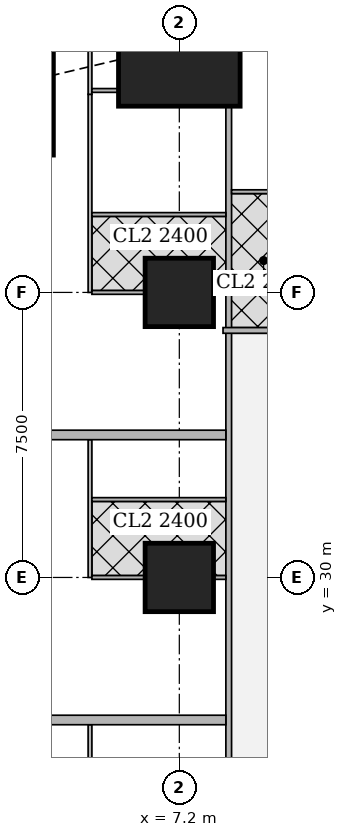
"""IFC4 building model, lengths in metres.
Left out: names, types, materials, properties, quantities, classifications, styles, units other than length and angle.
Written with IfcOpenShell. Run it as: python <this file> out.ifc"""

import sys

from ifc_helpers import new_model, si_unit, direction, frame, frame_2d, origin, origin_2d, place, context, subcontext, project, spatial, rectangle, extrude, element, fill, save


model = new_model("IFC4")
c1 = context("Model", 3, precision=1e-05, world=origin(), true_north=direction((0.0, 1.0)))
c2 = subcontext(c1, "Body", "Model", "MODEL_VIEW")
j1 = project(units=[si_unit("LENGTHUNIT", "METRE"), si_unit("PLANEANGLEUNIT", "RADIAN")], contexts=[c1])
p1 = place(None, origin())
s1 = spatial("IfcSite", under=j1, at=p1, CompositionType="ELEMENT")
p2 = place(p1, origin())
s2 = spatial("IfcBuilding", under=s1, at=p2, CompositionType="ELEMENT")
p3 = place(p2, frame((0.0, 0.0, 20.0)))
s3 = spatial("IfcBuildingStorey", under=s2, at=p3, CompositionType="ELEMENT", Elevation=20.0)
for number, where, z_axis, x_axis in (
    (1, (7.2, 30.0, 0.0), (0.0, 0.0, 1.0), (1.0, 0.0, 0.0)),
    (2, (7.2, 37.5, 0.0), (0.0, 0.0, 1.0), (1.0, 0.0, 0.0)),
):
    element("IfcColumn", number, at=place(p3, frame(where, z_axis=z_axis, x_axis=x_axis)), inside=s3, PredefinedType="COLUMN", context=c2, shape_type="SweptSolid", body=[
        extrude(rectangle(XDim=1.8, YDim=1.8, at=origin_2d()), origin(), (0.0, 0.0, 1.0), 3.75),
    ])
p4 = place(p3, frame((2.186, 42.814, 0.0), z_axis=(0.0, 0.0, 1.0), x_axis=(1.0, 0.0, 0.0)))
e3 = element("IfcColumn", 3, at=p4, inside=s3, PredefinedType="COLUMN", context=c2, shape_type="SweptSolid", body=[
    extrude(rectangle(XDim=3.4, YDim=3.4, at=origin_2d()), origin(), (0.0, 0.0, 1.0), 3.75),
])
p5 = place(p3, frame((7.2, 44.0, -0.3), z_axis=(0.0, 0.0, 1.0), x_axis=(1.0, 0.0, 0.0)))
e4 = element("IfcColumn", 4, at=p5, inside=s3, PredefinedType="COLUMN", context=c2, shape_type="SweptSolid", body=[
    extrude(rectangle(XDim=3.2, YDim=3.2, at=origin_2d()), origin(), (0.0, 0.0, 1.0), 4.05),
])
p6 = place(p3, frame((8.5, 2.626, 0.0), z_axis=(0.0, 0.0, 1.0), x_axis=(0.0, 1.0, 0.0)))
e5 = element("IfcWall", 5, at=p6, inside=s3, PredefinedType="SOLIDWALL", context=c2, shape_type="SweptSolid", body=[
    extrude(rectangle(XDim=39.773, YDim=0.15, at=frame_2d((19.886, 0.0))), origin(), (0.0, 0.0, 1.0), 2.05),
])
p7 = place(p6, frame((9.786, 0.0, 0.0)))
e6 = element("IfcOpeningElement", 6, at=p7, cuts=e5, PredefinedType="OPENING", context=c2, shape_type="SweptSolid", body=[
    extrude(rectangle(XDim=1.0, YDim=2.0, at=frame_2d((0.5, 1.0))), frame((0.0, 0.085, 0.0), z_axis=(0.0, -1.0, 0.0), x_axis=(1.0, 0.0, 0.0)), (0.0, 0.0, 1.0), 0.17),
])
p8 = place(p6, frame((13.961, 0.0, 0.0)))
e7 = element("IfcOpeningElement", 7, at=p8, cuts=e5, PredefinedType="OPENING", context=c2, shape_type="SweptSolid", body=[
    extrude(rectangle(XDim=1.0, YDim=2.0, at=frame_2d((0.5, 1.0))), frame((0.0, 0.085, 0.0), z_axis=(0.0, -1.0, 0.0), x_axis=(1.0, 0.0, 0.0)), (0.0, 0.0, 1.0), 0.17),
])
p9 = place(p6, frame((24.787, 0.0, 0.0)))
e8 = element("IfcOpeningElement", 8, at=p9, cuts=e5, PredefinedType="OPENING", context=c2, shape_type="SweptSolid", body=[
    extrude(rectangle(XDim=1.0, YDim=2.0, at=frame_2d((0.5, 1.0))), frame((0.0, 0.085, 0.0), z_axis=(0.0, -1.0, 0.0), x_axis=(1.0, 0.0, 0.0)), (0.0, 0.0, 1.0), 0.17),
])
p10 = place(p6, frame((32.287, 0.0, 0.0)))
e9 = element("IfcOpeningElement", 9, at=p10, cuts=e5, PredefinedType="OPENING", context=c2, shape_type="SweptSolid", body=[
    extrude(rectangle(XDim=1.0, YDim=2.0, at=frame_2d((0.5, 1.0))), frame((0.0, 0.085, 0.0), z_axis=(0.0, -1.0, 0.0), x_axis=(1.0, 0.0, 0.0)), (0.0, 0.0, 1.0), 0.17),
])
p11 = place(p3, frame((8.35, 36.5, 0.0), z_axis=(0.0, 0.0, 1.0), x_axis=(1.0, 0.0, 0.0)))
e10 = element("IfcWall", 10, at=p11, inside=s3, PredefinedType="SOLIDWALL", context=c2, shape_type="SweptSolid", body=[
    extrude(rectangle(XDim=26.415, YDim=0.15, at=frame_2d((13.208, 0.0))), origin(), (0.0, 0.0, 1.0), 3.5),
])
p12 = place(p11, frame((3.383, 0.0, 0.0)))
e11 = element("IfcOpeningElement", 11, at=p12, cuts=e10, PredefinedType="OPENING", context=c2, shape_type="SweptSolid", body=[
    extrude(rectangle(XDim=1.0, YDim=2.1, at=frame_2d((0.5, 1.05))), frame((0.0, 0.085, 0.0), z_axis=(0.0, -1.0, 0.0), x_axis=(1.0, 0.0, 0.0)), (0.0, 0.0, 1.0), 0.17),
])
p13 = place(p11, frame((7.65, 0.0, 0.0)))
e12 = element("IfcOpeningElement", 12, at=p13, cuts=e10, PredefinedType="OPENING", context=c2, shape_type="SweptSolid", body=[
    extrude(rectangle(XDim=1.0, YDim=2.1, at=frame_2d((0.5, 1.05))), frame((0.0, 0.085, 0.0), z_axis=(0.0, -1.0, 0.0), x_axis=(1.0, 0.0, 0.0)), (0.0, 0.0, 1.0), 0.17),
])
p14 = place(p11, frame((14.857, 0.0, 0.0)))
e13 = element("IfcOpeningElement", 13, at=p14, cuts=e10, PredefinedType="OPENING", context=c2, shape_type="SweptSolid", body=[
    extrude(rectangle(XDim=1.0, YDim=2.1, at=frame_2d((0.5, 1.05))), frame((0.0, 0.085, 0.0), z_axis=(0.0, -1.0, 0.0), x_axis=(1.0, 0.0, 0.0)), (0.0, 0.0, 1.0), 0.17),
])
p15 = place(p3, frame((4.85, 18.75, 0.0), z_axis=(0.0, 0.0, 1.0), x_axis=(0.0, 1.0, 0.0)))
e14 = element("IfcWall", 14, at=p15, inside=s3, PredefinedType="PARTITIONING", context=c2, shape_type="SweptSolid", body=[
    extrude(rectangle(XDim=7.375, YDim=0.1, at=frame_2d((3.688, 0.0))), origin(), (0.0, 0.0, 1.0), 3.5),
])
p16 = place(p15, frame((0.575, 0.0, 0.0)))
e15 = element("IfcOpeningElement", 15, at=p16, cuts=e14, PredefinedType="OPENING", context=c2, shape_type="SweptSolid", body=[
    extrude(rectangle(XDim=0.9, YDim=2.1, at=frame_2d((0.45, 1.05))), frame((0.0, 0.06, 0.0), z_axis=(0.0, -1.0, 0.0), x_axis=(1.0, 0.0, 0.0)), (0.0, 0.0, 1.0), 0.12),
])
p17 = place(p15, frame((4.1, 0.0, 0.0)))
e16 = element("IfcOpeningElement", 16, at=p17, cuts=e14, PredefinedType="OPENING", context=c2, shape_type="SweptSolid", body=[
    extrude(rectangle(XDim=0.9, YDim=2.1, at=frame_2d((0.45, 1.05))), frame((0.0, 0.06, 0.0), z_axis=(0.0, -1.0, 0.0), x_axis=(1.0, 0.0, 0.0)), (0.0, 0.0, 1.0), 0.12),
])
p18 = place(p15, frame((2.45, 0.0, 0.0)))
e17 = element("IfcOpeningElement", 17, at=p18, cuts=e14, PredefinedType="OPENING", context=c2, shape_type="SweptSolid", body=[
    extrude(rectangle(XDim=0.9, YDim=2.1, at=frame_2d((0.45, 1.05))), frame((0.0, 0.06, 0.0), z_axis=(0.0, -1.0, 0.0), x_axis=(1.0, 0.0, 0.0)), (0.0, 0.0, 1.0), 0.12),
])
p19 = place(p15, frame((5.975, 0.0, 0.0)))
e18 = element("IfcOpeningElement", 18, at=p19, cuts=e14, PredefinedType="OPENING", context=c2, shape_type="SweptSolid", body=[
    extrude(rectangle(XDim=0.9, YDim=2.1, at=frame_2d((0.45, 1.05))), frame((0.0, 0.06, 0.0), z_axis=(0.0, -1.0, 0.0), x_axis=(1.0, 0.0, 0.0)), (0.0, 0.0, 1.0), 0.12),
])
p20 = place(p3, frame((4.85, 30.0, 0.0), z_axis=(0.0, 0.0, 1.0), x_axis=(0.0, 1.0, 0.0)))
e19 = element("IfcWall", 19, at=p20, inside=s3, PredefinedType="PARTITIONING", context=c2, shape_type="SweptSolid", body=[
    extrude(rectangle(XDim=3.625, YDim=0.1, at=frame_2d((1.812, 0.0))), origin(), (0.0, 0.0, 1.0), 3.5),
])
p21 = place(p20, frame((0.575, 0.0, 0.0)))
e20 = element("IfcOpeningElement", 20, at=p21, cuts=e19, PredefinedType="OPENING", context=c2, shape_type="SweptSolid", body=[
    extrude(rectangle(XDim=0.9, YDim=2.1, at=frame_2d((0.45, 1.05))), frame((0.0, 0.06, 0.0), z_axis=(0.0, -1.0, 0.0), x_axis=(1.0, 0.0, 0.0)), (0.0, 0.0, 1.0), 0.12),
])
p22 = place(p20, frame((2.45, 0.0, 0.0)))
e21 = element("IfcOpeningElement", 21, at=p22, cuts=e19, PredefinedType="OPENING", context=c2, shape_type="SweptSolid", body=[
    extrude(rectangle(XDim=0.9, YDim=2.1, at=frame_2d((0.45, 1.05))), frame((0.0, 0.06, 0.0), z_axis=(0.0, -1.0, 0.0), x_axis=(1.0, 0.0, 0.0)), (0.0, 0.0, 1.0), 0.12),
])
p23 = place(p3, frame((4.9, 30.0, 0.0), z_axis=(0.0, 0.0, 1.0), x_axis=(1.0, 0.0, 0.0)))
e22 = element("IfcWall", 22, at=p23, inside=s3, PredefinedType="PARTITIONING", context=c2, shape_type="SweptSolid", body=[
    extrude(rectangle(XDim=1.399, YDim=0.1, at=frame_2d((0.7, 0.0))), origin(), (0.0, 0.0, 1.0), 3.5),
])
p24 = place(p3, frame((8.101, 30.0, 0.0), z_axis=(0.0, 0.0, 1.0), x_axis=(1.0, 0.0, 0.0)))
e23 = element("IfcWall", 23, at=p24, inside=s3, PredefinedType="PARTITIONING", context=c2, shape_type="SweptSolid", body=[
    extrude(rectangle(XDim=0.324, YDim=0.1, at=frame_2d((0.162, 0.0))), origin(), (0.0, 0.0, 1.0), 3.5),
])
p25 = place(p3, frame((4.9, 32.05, 0.0), z_axis=(0.0, 0.0, 1.0), x_axis=(1.0, 0.0, 0.0)))
e24 = element("IfcWall", 24, at=p25, inside=s3, PredefinedType="PARTITIONING", context=c2, shape_type="SweptSolid", body=[
    extrude(rectangle(XDim=3.525, YDim=0.1, at=frame_2d((1.763, 0.0))), origin(), (0.0, 0.0, 1.0), 3.5),
])
p26 = place(p3, frame((3.65, 26.25, 0.0), z_axis=(0.0, 0.0, 1.0), x_axis=(1.0, 0.0, 0.0)))
e25 = element("IfcWall", 25, at=p26, inside=s3, PredefinedType="SOLIDWALL", context=c2, shape_type="SweptSolid", body=[
    extrude(rectangle(XDim=4.775, YDim=0.25, at=frame_2d((2.388, 0.0))), origin(), (0.0, 0.0, 1.0), 3.5),
])
p27 = place(p3, frame((4.85, 37.5, 0.0), z_axis=(0.0, 0.0, 1.0), x_axis=(0.0, 1.0, 0.0)))
e26 = element("IfcWall", 26, at=p27, inside=s3, PredefinedType="PARTITIONING", context=c2, shape_type="SweptSolid", body=[
    extrude(rectangle(XDim=5.213, YDim=0.1, at=frame_2d((2.606, 0.0))), origin(), (0.0, 0.0, 1.0), 3.5),
])
p28 = place(p27, frame((0.575, 0.0, 0.0)))
e27 = element("IfcOpeningElement", 27, at=p28, cuts=e26, PredefinedType="OPENING", context=c2, shape_type="SweptSolid", body=[
    extrude(rectangle(XDim=0.9, YDim=2.1, at=frame_2d((0.45, 1.05))), frame((0.0, 0.06, 0.0), z_axis=(0.0, -1.0, 0.0), x_axis=(1.0, 0.0, 0.0)), (0.0, 0.0, 1.0), 0.12),
])
p29 = place(p27, frame((2.85, 0.0, 0.0)))
e28 = element("IfcOpeningElement", 28, at=p29, cuts=e26, PredefinedType="OPENING", context=c2, shape_type="SweptSolid", body=[
    extrude(rectangle(XDim=0.9, YDim=2.1, at=frame_2d((0.45, 1.05))), frame((0.0, 0.06, 0.0), z_axis=(0.0, -1.0, 0.0), x_axis=(1.0, 0.0, 0.0)), (0.0, 0.0, 1.0), 0.12),
])
p30 = place(p3, frame((4.85, 42.713, 0.0), z_axis=(0.0, 0.0, 1.0), x_axis=(0.0, 1.0, 0.0)))
e29 = element("IfcWall", 29, at=p30, inside=s3, PredefinedType="PARTITIONING", context=c2, shape_type="SweptSolid", body=[
    extrude(rectangle(XDim=1.462, YDim=0.1, at=frame_2d((0.731, 0.0))), origin(), (0.0, 0.0, 1.0), 2.1),
])
p31 = place(p3, frame((4.9, 37.5, 0.0), z_axis=(0.0, 0.0, 1.0), x_axis=(1.0, 0.0, 0.0)))
e30 = element("IfcWall", 30, at=p31, inside=s3, PredefinedType="PARTITIONING", context=c2, shape_type="SweptSolid", body=[
    extrude(rectangle(XDim=1.399, YDim=0.1, at=frame_2d((0.7, 0.0))), origin(), (0.0, 0.0, 1.0), 3.5),
])
p32 = place(p3, frame((8.101, 37.5, 0.0), z_axis=(0.0, 0.0, 1.0), x_axis=(1.0, 0.0, 0.0)))
e31 = element("IfcWall", 31, at=p32, inside=s3, PredefinedType="PARTITIONING", context=c2, shape_type="SweptSolid", body=[
    extrude(rectangle(XDim=0.324, YDim=0.1, at=frame_2d((0.162, 0.0))), origin(), (0.0, 0.0, 1.0), 3.5),
])
p33 = place(p3, frame((4.9, 42.814, 0.0), z_axis=(0.0, 0.0, 1.0), x_axis=(1.0, 0.0, 0.0)))
e32 = element("IfcWall", 32, at=p33, inside=s3, PredefinedType="PARTITIONING", context=c2, shape_type="SweptSolid", body=[
    extrude(rectangle(XDim=0.699, YDim=0.1, at=frame_2d((0.35, 0.0))), origin(), (0.0, 0.0, 1.0), 2.1),
])
p34 = place(p3, frame((4.9, 39.55, 0.0), z_axis=(0.0, 0.0, 1.0), x_axis=(1.0, 0.0, 0.0)))
e33 = element("IfcWall", 33, at=p34, inside=s3, PredefinedType="PARTITIONING", context=c2, shape_type="SweptSolid", body=[
    extrude(rectangle(XDim=3.525, YDim=0.1, at=frame_2d((1.763, 0.0))), origin(), (0.0, 0.0, 1.0), 3.5),
])
p35 = place(p3, frame((3.65, 33.75, 0.0), z_axis=(0.0, 0.0, 1.0), x_axis=(1.0, 0.0, 0.0)))
e34 = element("IfcWall", 34, at=p35, inside=s3, PredefinedType="SOLIDWALL", context=c2, shape_type="SweptSolid", body=[
    extrude(rectangle(XDim=4.775, YDim=0.25, at=frame_2d((2.388, 0.0))), origin(), (0.0, 0.0, 1.0), 3.5),
])
p36 = place(p3, frame((8.575, 40.15, 0.0), z_axis=(0.0, 0.0, 1.0), x_axis=(1.0, 0.0, 0.0)))
e35 = element("IfcWall", 35, at=p36, inside=s3, PredefinedType="PARTITIONING", context=c2, shape_type="SweptSolid", body=[
    extrude(rectangle(XDim=1.815, YDim=0.1, at=frame_2d((0.907, 0.0))), origin(), (0.0, 0.0, 1.0), 3.5),
])
p37 = place(p36, frame((0.425, 0.0, 0.0)))
e36 = element("IfcOpeningElement", 36, at=p37, cuts=e35, PredefinedType="OPENING", context=c2, shape_type="SweptSolid", body=[
    extrude(rectangle(XDim=0.9, YDim=2.1, at=frame_2d((0.45, 1.05))), frame((0.0, 0.06, 0.0), z_axis=(0.0, -1.0, 0.0), x_axis=(1.0, 0.0, 0.0)), (0.0, 0.0, 1.0), 0.12),
])
p38 = place(p19, origin())
e37 = element("IfcDoor", 37, at=p38, inside=s3, OperationType="SINGLE_SWING_LEFT", PredefinedType="DOOR", context=c2, shape_type="SweptSolid", body=[
    extrude(rectangle(XDim=0.9, YDim=2.1, at=frame_2d((0.45, 1.05))), frame((0.0, 0.025, 0.0), z_axis=(0.0, -1.0, 0.0), x_axis=(1.0, 0.0, 0.0)), (0.0, 0.0, 1.0), 0.05),
])
fill(e18, e37)
p39 = place(p21, origin())
e38 = element("IfcDoor", 38, at=p39, inside=s3, OperationType="SINGLE_SWING_RIGHT", PredefinedType="DOOR", context=c2, shape_type="SweptSolid", body=[
    extrude(rectangle(XDim=0.9, YDim=2.1, at=frame_2d((0.45, 1.05))), frame((0.0, 0.025, 0.0), z_axis=(0.0, -1.0, 0.0), x_axis=(1.0, 0.0, 0.0)), (0.0, 0.0, 1.0), 0.05),
])
fill(e20, e38)
p40 = place(p22, origin())
e39 = element("IfcDoor", 39, at=p40, inside=s3, OperationType="SINGLE_SWING_LEFT", PredefinedType="DOOR", context=c2, shape_type="SweptSolid", body=[
    extrude(rectangle(XDim=0.9, YDim=2.1, at=frame_2d((0.45, 1.05))), frame((0.0, 0.025, 0.0), z_axis=(0.0, -1.0, 0.0), x_axis=(1.0, 0.0, 0.0)), (0.0, 0.0, 1.0), 0.05),
])
fill(e21, e39)
p41 = place(p9, origin())
e40 = element("IfcDoor", 40, at=p41, inside=s3, OperationType="SINGLE_SWING_LEFT", PredefinedType="DOOR", context=c2, shape_type="SweptSolid", body=[
    extrude(rectangle(XDim=1.0, YDim=2.0, at=frame_2d((0.5, 1.0))), frame((0.0, 0.025, 0.0), z_axis=(0.0, -1.0, 0.0), x_axis=(1.0, 0.0, 0.0)), (0.0, 0.0, 1.0), 0.05),
])
fill(e8, e40)
p42 = place(p28, origin())
e41 = element("IfcDoor", 41, at=p42, inside=s3, OperationType="SINGLE_SWING_RIGHT", PredefinedType="DOOR", context=c2, shape_type="SweptSolid", body=[
    extrude(rectangle(XDim=0.9, YDim=2.1, at=frame_2d((0.45, 1.05))), frame((0.0, 0.025, 0.0), z_axis=(0.0, -1.0, 0.0), x_axis=(1.0, 0.0, 0.0)), (0.0, 0.0, 1.0), 0.05),
])
fill(e27, e41)
p43 = place(p29, origin())
e42 = element("IfcDoor", 42, at=p43, inside=s3, OperationType="SINGLE_SWING_RIGHT", PredefinedType="DOOR", context=c2, shape_type="SweptSolid", body=[
    extrude(rectangle(XDim=0.9, YDim=2.1, at=frame_2d((0.45, 1.05))), frame((0.0, 0.025, 0.0), z_axis=(0.0, -1.0, 0.0), x_axis=(1.0, 0.0, 0.0)), (0.0, 0.0, 1.0), 0.05),
])
fill(e28, e42)
p44 = place(p10, origin())
e43 = element("IfcDoor", 43, at=p44, inside=s3, OperationType="SINGLE_SWING_LEFT", PredefinedType="DOOR", context=c2, shape_type="SweptSolid", body=[
    extrude(rectangle(XDim=1.0, YDim=2.0, at=frame_2d((0.5, 1.0))), frame((0.0, 0.025, 0.0), z_axis=(0.0, -1.0, 0.0), x_axis=(1.0, 0.0, 0.0)), (0.0, 0.0, 1.0), 0.05),
])
fill(e9, e43)
p45 = place(p37, origin())
e44 = element("IfcDoor", 44, at=p45, inside=s3, OperationType="SINGLE_SWING_RIGHT", PredefinedType="DOOR", context=c2, shape_type="SweptSolid", body=[
    extrude(rectangle(XDim=0.9, YDim=2.1, at=frame_2d((0.45, 1.05))), frame((0.0, 0.025, 0.0), z_axis=(0.0, -1.0, 0.0), x_axis=(1.0, 0.0, 0.0)), (0.0, 0.0, 1.0), 0.05),
])
fill(e36, e44)
save(model, sys.argv[1])
